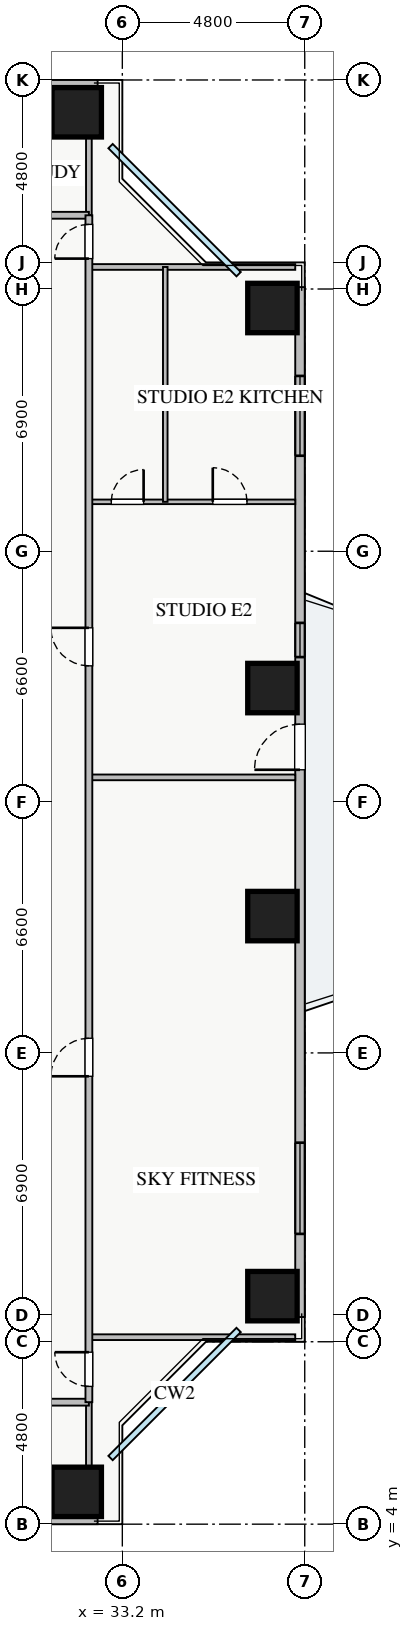
"""IFC4 building model, lengths in metres.
Left out: names, types, materials, properties, quantities, classifications, styles, units other than length and angle.
Written with IfcOpenShell. Run it as: python <this file> out.ifc"""

import sys

from ifc_helpers import new_model, si_unit, direction, frame, frame_2d, origin, origin_2d, place, context, subcontext, project, spatial, rectangle, extrude, source, transform, mapped, element, fill, save


model = new_model("IFC4")
c1 = context("Model", 3, precision=1e-05, world=origin(), true_north=direction((0.0, 1.0)))
c2 = subcontext(c1, "Body", "Model", "MODEL_VIEW")
j1 = project(units=[si_unit("LENGTHUNIT", "METRE"), si_unit("PLANEANGLEUNIT", "RADIAN")], contexts=[c1])
p1 = place(None, origin())
s1 = spatial("IfcSite", under=j1, at=p1, CompositionType="ELEMENT")
p2 = place(p1, origin())
s2 = spatial("IfcBuilding", under=s1, at=p2, CompositionType="ELEMENT")
p3 = place(p2, frame((0.0, 0.0, 26.25)))
s3 = spatial("IfcBuildingStorey", under=s2, at=p3, CompositionType="ELEMENT", Elevation=26.25)
m1 = source(origin(), c2, "Body", "SweptSolid", [
    extrude(rectangle(XDim=1.3, YDim=1.3, at=origin_2d()), origin(), (0.0, 0.0, 1.0), 3.25),
])
for number, where, z_axis, x_axis in (
    (1, (32.0, 4.85, 0.0), (0.0, 0.0, 1.0), (1.0, 0.0, 0.0)),
    (2, (37.15, 10.0, 0.0), (0.0, 0.0, 1.0), (1.0, 0.0, 0.0)),
    (3, (37.15, 20.0, 0.0), (0.0, 0.0, 1.0), (1.0, 0.0, 0.0)),
    (4, (37.15, 26.0, 0.0), (0.0, 0.0, 1.0), (1.0, 0.0, 0.0)),
    (5, (37.15, 36.0, 0.0), (0.0, 0.0, 1.0), (1.0, 0.0, 0.0)),
    (6, (32.0, 41.15, 0.0), (0.0, 0.0, 1.0), (1.0, 0.0, 0.0)),
):
    element("IfcColumn", number, at=place(p3, frame(where, z_axis=z_axis, x_axis=x_axis)), inside=s3, PredefinedType="COLUMN", context=c2, shape_type="MappedRepresentation", body=[
        mapped(m1, transform((0.0, 0.0, 0.0), x_axis=(1.0, 0.0, 0.0), y_axis=(0.0, 1.0, 0.0), z_axis=(0.0, 0.0, 1.0), scale=1.0)),
    ])
p4 = place(p3, frame((5.45, 4.125, 0.0), z_axis=(0.0, 0.0, 1.0), x_axis=(1.0, 0.0, 0.0)))
e7 = element("IfcWall", 7, at=p4, inside=s3, PredefinedType="STANDARD", context=c2, shape_type="SweptSolid", body=[
    extrude(rectangle(XDim=27.1, YDim=0.25, at=frame_2d((13.55, 0.0))), origin(), (0.0, 0.0, 1.0), 2.61),
])
p5 = place(p4, frame((14.4, 0.0, 0.0)))
e8 = element("IfcOpeningElement", 8, at=p5, cuts=e7, PredefinedType="OPENING", context=c2, shape_type="SweptSolid", body=[
    extrude(rectangle(XDim=1.2, YDim=2.1, at=frame_2d((0.6, 1.05))), frame((0.0, 0.135, 0.0), z_axis=(0.0, -1.0, 0.0), x_axis=(1.0, 0.0, 0.0)), (0.0, 0.0, 1.0), 0.27),
])
p6 = place(p4, frame((1.48, 0.0, 0.9)))
e9 = element("IfcOpeningElement", 9, at=p6, cuts=e7, PredefinedType="OPENING", context=c2, shape_type="SweptSolid", body=[
    extrude(rectangle(XDim=1.5, YDim=1.5, at=frame_2d((0.75, 0.75))), frame((0.0, 0.135, 0.0), z_axis=(0.0, -1.0, 0.0), x_axis=(1.0, 0.0, 0.0)), (0.0, 0.0, 1.0), 0.27),
])
p7 = place(p4, frame((9.263, 0.0, 0.9)))
e10 = element("IfcOpeningElement", 10, at=p7, cuts=e7, PredefinedType="OPENING", context=c2, shape_type="SweptSolid", body=[
    extrude(rectangle(XDim=1.8, YDim=1.45, at=frame_2d((0.9, 0.725))), frame((0.0, 0.135, 0.0), z_axis=(0.0, -1.0, 0.0), x_axis=(1.0, 0.0, 0.0)), (0.0, 0.0, 1.0), 0.27),
])
p8 = place(p4, frame((16.188, 0.0, 0.9)))
e11 = element("IfcOpeningElement", 11, at=p8, cuts=e7, PredefinedType="OPENING", context=c2, shape_type="SweptSolid", body=[
    extrude(rectangle(XDim=1.5, YDim=1.45, at=frame_2d((0.75, 0.725))), frame((0.0, 0.135, 0.0), z_axis=(0.0, -1.0, 0.0), x_axis=(1.0, 0.0, 0.0)), (0.0, 0.0, 1.0), 0.27),
])
p9 = place(p4, frame((22.663, 0.0, 0.9)))
e12 = element("IfcOpeningElement", 12, at=p9, cuts=e7, PredefinedType="OPENING", context=c2, shape_type="SweptSolid", body=[
    extrude(rectangle(XDim=2.1, YDim=1.48, at=frame_2d((1.05, 0.74))), frame((0.0, 0.135, 0.0), z_axis=(0.0, -1.0, 0.0), x_axis=(1.0, 0.0, 0.0)), (0.0, 0.0, 1.0), 0.27),
])
p10 = place(p4, frame((5.114, 0.0, 0.9)))
e13 = element("IfcOpeningElement", 13, at=p10, cuts=e7, PredefinedType="OPENING", context=c2, shape_type="SweptSolid", body=[
    extrude(rectangle(XDim=2.4, YDim=1.5, at=frame_2d((1.2, 0.75))), frame((0.0, 0.135, 0.0), z_axis=(0.0, -1.0, 0.0), x_axis=(1.0, 0.0, 0.0)), (0.0, 0.0, 1.0), 0.27),
])
p11 = place(p3, frame((5.45, 41.875, 0.0), z_axis=(0.0, 0.0, 1.0), x_axis=(1.0, 0.0, 0.0)))
e14 = element("IfcWall", 14, at=p11, inside=s3, PredefinedType="STANDARD", context=c2, shape_type="SweptSolid", body=[
    extrude(rectangle(XDim=27.1, YDim=0.25, at=frame_2d((13.55, 0.0))), origin(), (0.0, 0.0, 1.0), 2.61),
])
p12 = place(p11, frame((14.4, 0.0, 0.0)))
e15 = element("IfcOpeningElement", 15, at=p12, cuts=e14, PredefinedType="OPENING", context=c2, shape_type="SweptSolid", body=[
    extrude(rectangle(XDim=1.2, YDim=2.1, at=frame_2d((0.6, 1.05))), frame((0.0, 0.135, 0.0), z_axis=(0.0, -1.0, 0.0), x_axis=(1.0, 0.0, 0.0)), (0.0, 0.0, 1.0), 0.27),
])
p13 = place(p11, frame((1.48, 0.0, 0.9)))
e16 = element("IfcOpeningElement", 16, at=p13, cuts=e14, PredefinedType="OPENING", context=c2, shape_type="SweptSolid", body=[
    extrude(rectangle(XDim=1.5, YDim=1.5, at=frame_2d((0.75, 0.75))), frame((0.0, 0.135, 0.0), z_axis=(0.0, -1.0, 0.0), x_axis=(1.0, 0.0, 0.0)), (0.0, 0.0, 1.0), 0.27),
])
p14 = place(p11, frame((9.263, 0.0, 0.9)))
e17 = element("IfcOpeningElement", 17, at=p14, cuts=e14, PredefinedType="OPENING", context=c2, shape_type="SweptSolid", body=[
    extrude(rectangle(XDim=1.8, YDim=1.45, at=frame_2d((0.9, 0.725))), frame((0.0, 0.135, 0.0), z_axis=(0.0, -1.0, 0.0), x_axis=(1.0, 0.0, 0.0)), (0.0, 0.0, 1.0), 0.27),
])
p15 = place(p11, frame((16.188, 0.0, 0.9)))
e18 = element("IfcOpeningElement", 18, at=p15, cuts=e14, PredefinedType="OPENING", context=c2, shape_type="SweptSolid", body=[
    extrude(rectangle(XDim=1.5, YDim=1.45, at=frame_2d((0.75, 0.725))), frame((0.0, 0.135, 0.0), z_axis=(0.0, -1.0, 0.0), x_axis=(1.0, 0.0, 0.0)), (0.0, 0.0, 1.0), 0.27),
])
p16 = place(p11, frame((22.663, 0.0, 0.9)))
e19 = element("IfcOpeningElement", 19, at=p16, cuts=e14, PredefinedType="OPENING", context=c2, shape_type="SweptSolid", body=[
    extrude(rectangle(XDim=2.1, YDim=1.48, at=frame_2d((1.05, 0.74))), frame((0.0, 0.135, 0.0), z_axis=(0.0, -1.0, 0.0), x_axis=(1.0, 0.0, 0.0)), (0.0, 0.0, 1.0), 0.27),
])
p17 = place(p11, frame((5.114, 0.0, 0.9)))
e20 = element("IfcOpeningElement", 20, at=p17, cuts=e14, PredefinedType="OPENING", context=c2, shape_type="SweptSolid", body=[
    extrude(rectangle(XDim=2.4, YDim=1.5, at=frame_2d((1.2, 0.75))), frame((0.0, 0.135, 0.0), z_axis=(0.0, -1.0, 0.0), x_axis=(1.0, 0.0, 0.0)), (0.0, 0.0, 1.0), 0.27),
])
p18 = place(p3, frame((37.875, 9.45, 0.0), z_axis=(0.0, 0.0, 1.0), x_axis=(0.0, 1.0, 0.0)))
e21 = element("IfcWall", 21, at=p18, inside=s3, PredefinedType="STANDARD", context=c2, shape_type="SweptSolid", body=[
    extrude(rectangle(XDim=27.1, YDim=0.25, at=frame_2d((13.55, 0.0))), origin(), (0.0, 0.0, 1.0), 2.61),
])
p19 = place(p18, frame((14.4, 0.0, 0.0)))
e22 = element("IfcOpeningElement", 22, at=p19, cuts=e21, PredefinedType="OPENING", context=c2, shape_type="SweptSolid", body=[
    extrude(rectangle(XDim=1.2, YDim=2.1, at=frame_2d((0.6, 1.05))), frame((0.0, 0.135, 0.0), z_axis=(0.0, -1.0, 0.0), x_axis=(1.0, 0.0, 0.0)), (0.0, 0.0, 1.0), 0.27),
])
p20 = place(p18, frame((2.188, 0.0, 0.9)))
e23 = element("IfcOpeningElement", 23, at=p20, cuts=e21, PredefinedType="OPENING", context=c2, shape_type="SweptSolid", body=[
    extrude(rectangle(XDim=2.4, YDim=1.48, at=frame_2d((1.2, 0.74))), frame((0.0, 0.135, 0.0), z_axis=(0.0, -1.0, 0.0), x_axis=(1.0, 0.0, 0.0)), (0.0, 0.0, 1.0), 0.27),
])
p21 = place(p18, frame((22.663, 0.0, 0.9)))
e24 = element("IfcOpeningElement", 24, at=p21, cuts=e21, PredefinedType="OPENING", context=c2, shape_type="SweptSolid", body=[
    extrude(rectangle(XDim=2.1, YDim=1.48, at=frame_2d((1.05, 0.74))), frame((0.0, 0.135, 0.0), z_axis=(0.0, -1.0, 0.0), x_axis=(1.0, 0.0, 0.0)), (0.0, 0.0, 1.0), 0.27),
])
p22 = place(p18, frame((17.365, 0.0, 0.9)))
e25 = element("IfcOpeningElement", 25, at=p22, cuts=e21, PredefinedType="OPENING", context=c2, shape_type="SweptSolid", body=[
    extrude(rectangle(XDim=0.9, YDim=1.2, at=frame_2d((0.45, 0.6))), frame((0.0, 0.135, 0.0), z_axis=(0.0, -1.0, 0.0), x_axis=(1.0, 0.0, 0.0)), (0.0, 0.0, 1.0), 0.27),
])
p23 = place(p3, frame((32.32, 38.44, 0.0), z_axis=(0.0, 0.0, 1.0), x_axis=(0.0, 1.0, 0.0)))
e26 = element("IfcWall", 26, at=p23, inside=s3, PredefinedType="PARTITIONING", context=c2, shape_type="SweptSolid", body=[
    extrude(rectangle(XDim=3.31, YDim=0.15, at=frame_2d((1.655, 0.0))), origin(), (0.0, 0.0, 1.0), 3.07),
])
p24 = place(p3, frame((8.78, 38.44, 0.0), z_axis=(0.0, 0.0, 1.0), x_axis=(1.0, 0.0, 0.0)))
e27 = element("IfcWall", 27, at=p24, inside=s3, PredefinedType="PARTITIONING", context=c2, shape_type="SweptSolid", body=[
    extrude(rectangle(XDim=23.54, YDim=0.18, at=frame_2d((11.77, 0.0))), origin(), (0.0, 0.0, 1.0), 3.07),
])
p25 = place(p24, frame((4.66, 0.0, 0.0)))
e28 = element("IfcOpeningElement", 28, at=p25, cuts=e27, PredefinedType="OPENING", context=c2, shape_type="SweptSolid", body=[
    extrude(rectangle(XDim=1.0, YDim=2.05, at=frame_2d((0.5, 1.025))), frame((0.0, 0.1, 0.0), z_axis=(0.0, -1.0, 0.0), x_axis=(1.0, 0.0, 0.0)), (0.0, 0.0, 1.0), 0.2),
])
p26 = place(p24, frame((16.43, 0.0, 0.0)))
e29 = element("IfcOpeningElement", 29, at=p26, cuts=e27, PredefinedType="OPENING", context=c2, shape_type="SweptSolid", body=[
    extrude(rectangle(XDim=1.0, YDim=2.05, at=frame_2d((0.5, 1.025))), frame((0.0, 0.1, 0.0), z_axis=(0.0, -1.0, 0.0), x_axis=(1.0, 0.0, 0.0)), (0.0, 0.0, 1.0), 0.2),
])
p27 = place(p3, frame((32.32, 4.25, 0.0), z_axis=(0.0, 0.0, 1.0), x_axis=(0.0, 1.0, 0.0)))
e30 = element("IfcWall", 30, at=p27, inside=s3, PredefinedType="PARTITIONING", context=c2, shape_type="SweptSolid", body=[
    extrude(rectangle(XDim=2.96, YDim=0.15, at=frame_2d((1.48, 0.0))), origin(), (0.0, 0.0, 1.0), 3.07),
])
p28 = place(p3, frame((8.78, 7.21, 0.0), z_axis=(0.0, 0.0, 1.0), x_axis=(1.0, 0.0, 0.0)))
e31 = element("IfcWall", 31, at=p28, inside=s3, PredefinedType="PARTITIONING", context=c2, shape_type="SweptSolid", body=[
    extrude(rectangle(XDim=23.54, YDim=0.18, at=frame_2d((11.77, 0.0))), origin(), (0.0, 0.0, 1.0), 3.07),
])
p29 = place(p28, frame((3.78, 0.0, 0.0)))
e32 = element("IfcOpeningElement", 32, at=p29, cuts=e31, PredefinedType="OPENING", context=c2, shape_type="SweptSolid", body=[
    extrude(rectangle(XDim=1.0, YDim=2.05, at=frame_2d((0.5, 1.025))), frame((0.0, 0.1, 0.0), z_axis=(0.0, -1.0, 0.0), x_axis=(1.0, 0.0, 0.0)), (0.0, 0.0, 1.0), 0.2),
])
p30 = place(p28, frame((11.625, 0.0, 0.0)))
e33 = element("IfcOpeningElement", 33, at=p30, cuts=e31, PredefinedType="OPENING", context=c2, shape_type="SweptSolid", body=[
    extrude(rectangle(XDim=1.0, YDim=2.05, at=frame_2d((0.5, 1.025))), frame((0.0, 0.1, 0.0), z_axis=(0.0, -1.0, 0.0), x_axis=(1.0, 0.0, 0.0)), (0.0, 0.0, 1.0), 0.2),
])
p31 = place(p28, frame((19.115, 0.0, 0.0)))
e34 = element("IfcOpeningElement", 34, at=p31, cuts=e31, PredefinedType="OPENING", context=c2, shape_type="SweptSolid", body=[
    extrude(rectangle(XDim=1.0, YDim=2.05, at=frame_2d((0.5, 1.025))), frame((0.0, 0.1, 0.0), z_axis=(0.0, -1.0, 0.0), x_axis=(1.0, 0.0, 0.0)), (0.0, 0.0, 1.0), 0.2),
])
for number, where, z_axis, x_axis in (
    (35, (32.32, 37.08, 0.0), (0.0, 0.0, 1.0), (1.0, 0.0, 0.0)),
    (36, (32.32, 8.92, 0.0), (0.0, 0.0, 1.0), (1.0, 0.0, 0.0)),
):
    element("IfcWall", number, at=place(p3, frame(where, z_axis=z_axis, x_axis=x_axis)), inside=s3, PredefinedType="PARTITIONING", context=c2, shape_type="SweptSolid", body=[
        extrude(rectangle(XDim=5.43, YDim=0.15, at=frame_2d((2.715, 0.0))), origin(), (0.0, 0.0, 1.0), 3.07),
    ])
p32 = place(p3, frame((32.32, 30.9, 0.0), z_axis=(0.0, 0.0, 1.0), x_axis=(1.0, 0.0, 0.0)))
e37 = element("IfcWall", 37, at=p32, inside=s3, PredefinedType="PLUMBINGWALL", context=c2, shape_type="SweptSolid", body=[
    extrude(rectangle(XDim=5.43, YDim=0.12, at=frame_2d((2.715, 0.0))), origin(), (0.0, 0.0, 1.0), 3.07),
])
p33 = place(p32, frame((0.59, 0.0, 0.0)))
e38 = element("IfcOpeningElement", 38, at=p33, cuts=e37, PredefinedType="OPENING", context=c2, shape_type="SweptSolid", body=[
    extrude(rectangle(XDim=0.85, YDim=2.05, at=frame_2d((0.425, 1.025))), frame((0.0, 0.07, 0.0), z_axis=(0.0, -1.0, 0.0), x_axis=(1.0, 0.0, 0.0)), (0.0, 0.0, 1.0), 0.14),
])
p34 = place(p32, frame((3.26, 0.0, 0.0)))
e39 = element("IfcOpeningElement", 39, at=p34, cuts=e37, PredefinedType="OPENING", context=c2, shape_type="SweptSolid", body=[
    extrude(rectangle(XDim=0.9, YDim=2.05, at=frame_2d((0.45, 1.025))), frame((0.0, 0.07, 0.0), z_axis=(0.0, -1.0, 0.0), x_axis=(1.0, 0.0, 0.0)), (0.0, 0.0, 1.0), 0.14),
])
p35 = place(p3, frame((34.33, 30.9, 0.0), z_axis=(0.0, 0.0, 1.0), x_axis=(0.0, 1.0, 0.0)))
e40 = element("IfcWall", 40, at=p35, inside=s3, PredefinedType="PLUMBINGWALL", context=c2, shape_type="SweptSolid", body=[
    extrude(rectangle(XDim=6.18, YDim=0.12, at=frame_2d((3.09, 0.0))), origin(), (0.0, 0.0, 1.0), 3.07),
])
p36 = place(p3, frame((32.32, 23.65, 0.0), z_axis=(0.0, 0.0, 1.0), x_axis=(1.0, 0.0, 0.0)))
e41 = element("IfcWall", 41, at=p36, inside=s3, PredefinedType="PARTITIONING", context=c2, shape_type="SweptSolid", body=[
    extrude(rectangle(XDim=5.43, YDim=0.15, at=frame_2d((2.715, 0.0))), origin(), (0.0, 0.0, 1.0), 3.07),
])
p37 = place(p3, frame((32.32, 7.21, 0.0), z_axis=(0.0, 0.0, 1.0), x_axis=(0.0, 1.0, 0.0)))
e42 = element("IfcWall", 42, at=p37, inside=s3, PredefinedType="PARTITIONING", context=c2, shape_type="SweptSolid", body=[
    extrude(rectangle(XDim=31.23, YDim=0.18, at=frame_2d((15.615, 0.0))), origin(), (0.0, 0.0, 1.0), 2.715),
])
p38 = place(p37, frame((30.09, 0.0, 0.0)))
e43 = element("IfcOpeningElement", 43, at=p38, cuts=e42, PredefinedType="OPENING", context=c2, shape_type="SweptSolid", body=[
    extrude(rectangle(XDim=0.9, YDim=2.05, at=frame_2d((0.45, 1.025))), frame((0.0, 0.1, 0.0), z_axis=(0.0, -1.0, 0.0), x_axis=(1.0, 0.0, 0.0)), (0.0, 0.0, 1.0), 0.2),
])
p39 = place(p37, frame((0.415, 0.0, 0.0)))
e44 = element("IfcOpeningElement", 44, at=p39, cuts=e42, PredefinedType="OPENING", context=c2, shape_type="SweptSolid", body=[
    extrude(rectangle(XDim=0.9, YDim=2.05, at=frame_2d((0.45, 1.025))), frame((0.0, 0.1, 0.0), z_axis=(0.0, -1.0, 0.0), x_axis=(1.0, 0.0, 0.0)), (0.0, 0.0, 1.0), 0.2),
])
p40 = place(p37, frame((8.575, 0.0, 0.0)))
e45 = element("IfcOpeningElement", 45, at=p40, cuts=e42, PredefinedType="OPENING", context=c2, shape_type="SweptSolid", body=[
    extrude(rectangle(XDim=1.0, YDim=2.05, at=frame_2d((0.5, 1.025))), frame((0.0, 0.1, 0.0), z_axis=(0.0, -1.0, 0.0), x_axis=(1.0, 0.0, 0.0)), (0.0, 0.0, 1.0), 0.2),
])
p41 = place(p37, frame((19.375, 0.0, 0.0)))
e46 = element("IfcOpeningElement", 46, at=p41, cuts=e42, PredefinedType="OPENING", context=c2, shape_type="SweptSolid", body=[
    extrude(rectangle(XDim=1.0, YDim=2.05, at=frame_2d((0.5, 1.025))), frame((0.0, 0.1, 0.0), z_axis=(0.0, -1.0, 0.0), x_axis=(1.0, 0.0, 0.0)), (0.0, 0.0, 1.0), 0.2),
])
m2 = source(origin(), c2, "Body", "SweptSolid", [
    extrude(rectangle(XDim=1.2, YDim=2.1, at=frame_2d((0.6, 1.05))), frame((0.0, 0.025, 0.0), z_axis=(0.0, -1.0, 0.0), x_axis=(1.0, 0.0, 0.0)), (0.0, 0.0, 1.0), 0.05),
])
p42 = place(p19, origin())
e47 = element("IfcDoor", 47, at=p42, inside=s3, OperationType="SINGLE_SWING_LEFT", PredefinedType="DOOR", context=c2, shape_type="MappedRepresentation", body=[
    mapped(m2, transform((0.0, 0.0, 0.0), x_axis=(1.0, 0.0, 0.0), y_axis=(0.0, 1.0, 0.0), z_axis=(0.0, 0.0, 1.0), scale=1.0)),
])
fill(e22, e47)
m3 = source(origin(), c2, "Body", "SweptSolid", [
    extrude(rectangle(XDim=2.4, YDim=1.48, at=frame_2d((1.2, 0.74))), frame((0.0, 0.03, 0.0), z_axis=(0.0, -1.0, 0.0), x_axis=(1.0, 0.0, 0.0)), (0.0, 0.0, 1.0), 0.06),
])
p43 = place(p20, origin())
e48 = element("IfcWindow", 48, at=p43, inside=s3, PartitioningType="TRIPLE_PANEL_VERTICAL", PredefinedType="WINDOW", context=c2, shape_type="MappedRepresentation", body=[
    mapped(m3, transform((0.0, 0.0, 0.0), x_axis=(1.0, 0.0, 0.0), y_axis=(0.0, 1.0, 0.0), z_axis=(0.0, 0.0, 1.0), scale=1.0)),
])
fill(e23, e48)
m4 = source(origin(), c2, "Body", "SweptSolid", [
    extrude(rectangle(XDim=2.1, YDim=1.48, at=frame_2d((1.05, 0.74))), frame((0.0, 0.03, 0.0), z_axis=(0.0, -1.0, 0.0), x_axis=(1.0, 0.0, 0.0)), (0.0, 0.0, 1.0), 0.06),
])
p44 = place(p21, origin())
e49 = element("IfcWindow", 49, at=p44, inside=s3, PartitioningType="TRIPLE_PANEL_VERTICAL", PredefinedType="WINDOW", context=c2, shape_type="MappedRepresentation", body=[
    mapped(m4, transform((0.0, 0.0, 0.0), x_axis=(1.0, 0.0, 0.0), y_axis=(0.0, 1.0, 0.0), z_axis=(0.0, 0.0, 1.0), scale=1.0)),
])
fill(e24, e49)
m5 = source(origin(), c2, "Body", "SweptSolid", [
    extrude(rectangle(XDim=0.85, YDim=2.05, at=frame_2d((0.425, 1.025))), frame((0.0, 0.025, 0.0), z_axis=(0.0, -1.0, 0.0), x_axis=(1.0, 0.0, 0.0)), (0.0, 0.0, 1.0), 0.05),
])
p45 = place(p33, origin())
e50 = element("IfcDoor", 50, at=p45, inside=s3, OperationType="SINGLE_SWING_RIGHT", PredefinedType="DOOR", context=c2, shape_type="MappedRepresentation", body=[
    mapped(m5, transform((0.0, 0.0, 0.0), x_axis=(1.0, 0.0, 0.0), y_axis=(0.0, 1.0, 0.0), z_axis=(0.0, 0.0, 1.0), scale=1.0)),
])
fill(e38, e50)
m6 = source(origin(), c2, "Body", "SweptSolid", [
    extrude(rectangle(XDim=0.9, YDim=2.05, at=frame_2d((0.45, 1.025))), frame((0.0, 0.025, 0.0), z_axis=(0.0, -1.0, 0.0), x_axis=(1.0, 0.0, 0.0)), (0.0, 0.0, 1.0), 0.05),
])
p46 = place(p34, origin())
e51 = element("IfcDoor", 51, at=p46, inside=s3, OperationType="SINGLE_SWING_LEFT", PredefinedType="DOOR", context=c2, shape_type="MappedRepresentation", body=[
    mapped(m6, transform((0.0, 0.0, 0.0), x_axis=(1.0, 0.0, 0.0), y_axis=(0.0, 1.0, 0.0), z_axis=(0.0, 0.0, 1.0), scale=1.0)),
])
fill(e39, e51)
p47 = place(p38, origin())
e52 = element("IfcDoor", 52, at=p47, inside=s3, OperationType="SINGLE_SWING_LEFT", PredefinedType="DOOR", context=c2, shape_type="MappedRepresentation", body=[
    mapped(m6, transform((0.0, 0.0, 0.0), x_axis=(1.0, 0.0, 0.0), y_axis=(0.0, 1.0, 0.0), z_axis=(0.0, 0.0, 1.0), scale=1.0)),
])
fill(e43, e52)
p48 = place(p39, origin())
e53 = element("IfcDoor", 53, at=p48, inside=s3, OperationType="SINGLE_SWING_RIGHT", PredefinedType="DOOR", context=c2, shape_type="MappedRepresentation", body=[
    mapped(m6, transform((0.0, 0.0, 0.0), x_axis=(1.0, 0.0, 0.0), y_axis=(0.0, 1.0, 0.0), z_axis=(0.0, 0.0, 1.0), scale=1.0)),
])
fill(e44, e53)
m7 = source(origin(), c2, "Body", "SweptSolid", [
    extrude(rectangle(XDim=1.0, YDim=2.05, at=frame_2d((0.5, 1.025))), frame((0.0, 0.025, 0.0), z_axis=(0.0, -1.0, 0.0), x_axis=(1.0, 0.0, 0.0)), (0.0, 0.0, 1.0), 0.05),
])
p49 = place(p40, origin())
e54 = element("IfcDoor", 54, at=p49, inside=s3, OperationType="SINGLE_SWING_LEFT", PredefinedType="DOOR", context=c2, shape_type="MappedRepresentation", body=[
    mapped(m7, transform((0.0, 0.0, 0.0), x_axis=(1.0, 0.0, 0.0), y_axis=(0.0, 1.0, 0.0), z_axis=(0.0, 0.0, 1.0), scale=1.0)),
])
fill(e45, e54)
p50 = place(p41, origin())
e55 = element("IfcDoor", 55, at=p50, inside=s3, OperationType="SINGLE_SWING_RIGHT", PredefinedType="DOOR", context=c2, shape_type="MappedRepresentation", body=[
    mapped(m7, transform((0.0, 0.0, 0.0), x_axis=(1.0, 0.0, 0.0), y_axis=(0.0, 1.0, 0.0), z_axis=(0.0, 0.0, 1.0), scale=1.0)),
])
fill(e46, e55)
m8 = source(origin(), c2, "Body", "SweptSolid", [
    extrude(rectangle(XDim=0.9, YDim=1.2, at=frame_2d((0.45, 0.6))), frame((0.0, 0.03, 0.0), z_axis=(0.0, -1.0, 0.0), x_axis=(1.0, 0.0, 0.0)), (0.0, 0.0, 1.0), 0.06),
])
p51 = place(p22, origin())
e56 = element("IfcWindow", 56, at=p51, inside=s3, PartitioningType="SINGLE_PANEL", PredefinedType="WINDOW", context=c2, shape_type="MappedRepresentation", body=[
    mapped(m8, transform((0.0, 0.0, 0.0), x_axis=(1.0, 0.0, 0.0), y_axis=(0.0, 1.0, 0.0), z_axis=(0.0, 0.0, 1.0), scale=1.0)),
])
fill(e25, e56)
save(model, sys.argv[1])
